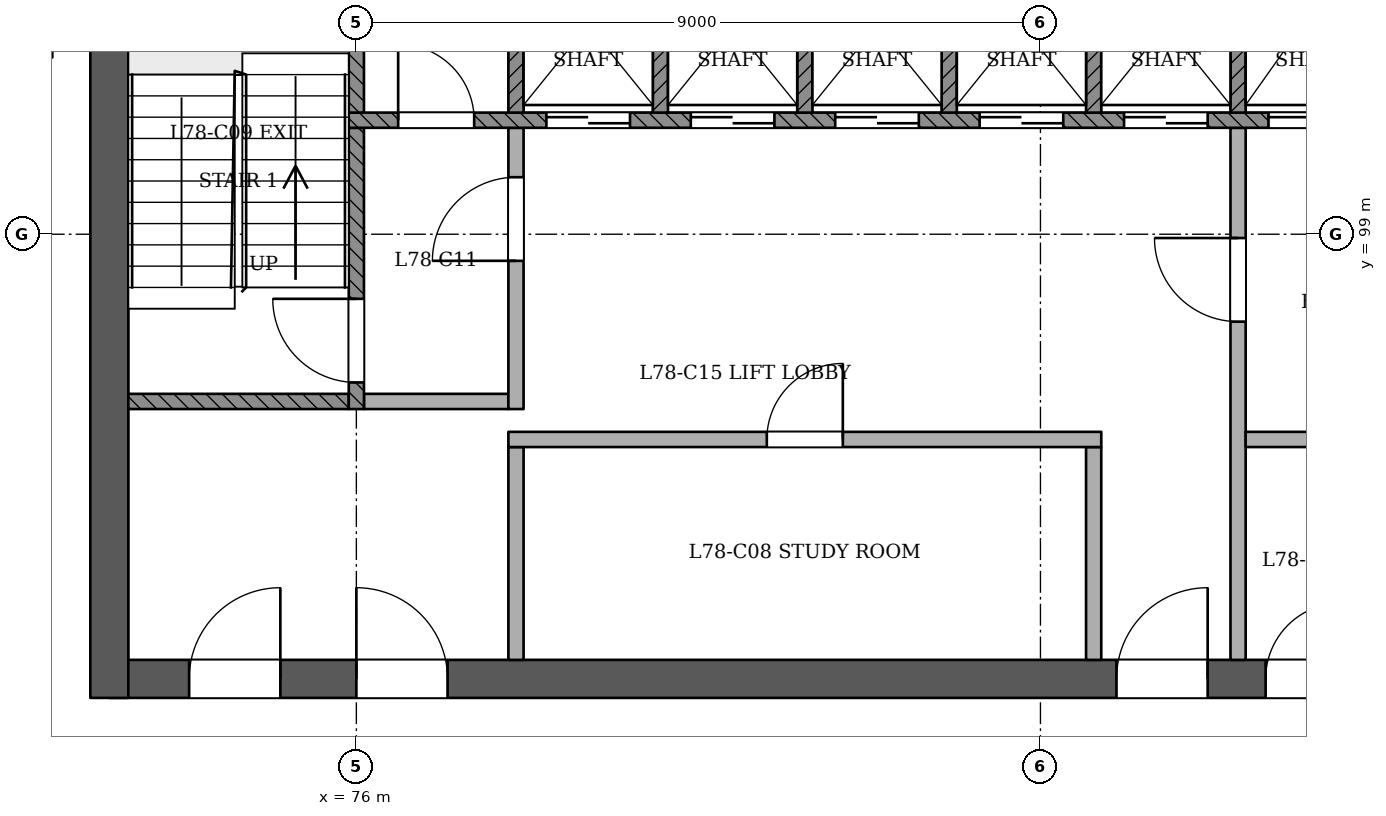
"""IFC4 building model, lengths in metres.
Left out: names, types, materials, properties, quantities, classifications, styles, units other than length and angle.
Written with IfcOpenShell. Run it as: python <this file> out.ifc"""

import sys

from ifc_helpers import new_model, si_unit, direction, frame, frame_2d, origin, place, context, subcontext, project, spatial, rectangle, extrude, element, fill, save


model = new_model("IFC4")
c1 = context("Model", 3, precision=1e-05, world=origin(), true_north=direction((0.0, 1.0)))
c2 = subcontext(c1, "Body", "Model", "MODEL_VIEW")
j1 = project(units=[si_unit("LENGTHUNIT", "METRE"), si_unit("PLANEANGLEUNIT", "RADIAN")], contexts=[c1])
p1 = place(None, origin())
s1 = spatial("IfcSite", under=j1, at=p1, CompositionType="ELEMENT")
p2 = place(p1, origin())
s2 = spatial("IfcBuilding", under=s1, at=p2, CompositionType="ELEMENT")
p3 = place(p2, frame((0.0, 0.0, 302.2)))
s3 = spatial("IfcBuildingStorey", under=s2, at=p3, CompositionType="ELEMENT", Elevation=302.2)
p4 = place(p3, frame((72.75, 93.15, 0.0), z_axis=(0.0, 0.0, 1.0), x_axis=(1.0, 0.0, 0.0)))
e1 = element("IfcWall", 1, at=p4, inside=s3, PredefinedType="SHEAR", context=c2, shape_type="SweptSolid", body=[
    extrude(rectangle(XDim=24.75, YDim=0.5, at=frame_2d((12.375, 0.0))), origin(), (0.0, 0.0, 1.0), 3.6),
])
p5 = place(p4, frame((1.05, 0.0, 0.0)))
e2 = element("IfcOpeningElement", 2, at=p5, cuts=e1, PredefinedType="OPENING", context=c2, shape_type="SweptSolid", body=[
    extrude(rectangle(XDim=1.2, YDim=2.1, at=frame_2d((0.6, 1.05))), frame((0.0, 0.26, 0.0), z_axis=(0.0, -1.0, 0.0), x_axis=(1.0, 0.0, 0.0)), (0.0, 0.0, 1.0), 0.521),
])
p6 = place(p4, frame((3.25, 0.0, 0.0)))
e3 = element("IfcOpeningElement", 3, at=p6, cuts=e1, PredefinedType="OPENING", context=c2, shape_type="SweptSolid", body=[
    extrude(rectangle(XDim=1.2, YDim=2.1, at=frame_2d((0.6, 1.05))), frame((0.0, 0.26, 0.0), z_axis=(0.0, -1.0, 0.0), x_axis=(1.0, 0.0, 0.0)), (0.0, 0.0, 1.0), 0.521),
])
p7 = place(p4, frame((13.25, 0.0, 0.0)))
e4 = element("IfcOpeningElement", 4, at=p7, cuts=e1, PredefinedType="OPENING", context=c2, shape_type="SweptSolid", body=[
    extrude(rectangle(XDim=1.2, YDim=2.1, at=frame_2d((0.6, 1.05))), frame((0.0, 0.26, 0.0), z_axis=(0.0, -1.0, 0.0), x_axis=(1.0, 0.0, 0.0)), (0.0, 0.0, 1.0), 0.521),
])
p8 = place(p4, frame((15.212, 0.0, 0.0)))
e5 = element("IfcOpeningElement", 5, at=p8, cuts=e1, PredefinedType="OPENING", context=c2, shape_type="SweptSolid", body=[
    extrude(rectangle(XDim=1.0, YDim=2.1, at=frame_2d((0.5, 1.05))), frame((0.0, 0.26, 0.0), z_axis=(0.0, -1.0, 0.0), x_axis=(1.0, 0.0, 0.0)), (0.0, 0.0, 1.0), 0.521),
])
p9 = place(p4, frame((18.05, 0.0, 0.0)))
e6 = element("IfcOpeningElement", 6, at=p9, cuts=e1, PredefinedType="OPENING", context=c2, shape_type="SweptSolid", body=[
    extrude(rectangle(XDim=1.0, YDim=2.1, at=frame_2d((0.5, 1.05))), frame((0.0, 0.26, 0.0), z_axis=(0.0, -1.0, 0.0), x_axis=(1.0, 0.0, 0.0)), (0.0, 0.0, 1.0), 0.521),
])
p10 = place(p4, frame((20.95, 0.0, 0.0)))
e7 = element("IfcOpeningElement", 7, at=p10, cuts=e1, PredefinedType="OPENING", context=c2, shape_type="SweptSolid", body=[
    extrude(rectangle(XDim=1.0, YDim=2.1, at=frame_2d((0.5, 1.05))), frame((0.0, 0.26, 0.0), z_axis=(0.0, -1.0, 0.0), x_axis=(1.0, 0.0, 0.0)), (0.0, 0.0, 1.0), 0.521),
])
p11 = place(p4, frame((22.837, 0.0, 0.0)))
e8 = element("IfcOpeningElement", 8, at=p11, cuts=e1, PredefinedType="OPENING", context=c2, shape_type="SweptSolid", body=[
    extrude(rectangle(XDim=1.0, YDim=2.1, at=frame_2d((0.5, 1.05))), frame((0.0, 0.26, 0.0), z_axis=(0.0, -1.0, 0.0), x_axis=(1.0, 0.0, 0.0)), (0.0, 0.0, 1.0), 0.521),
])
p12 = place(p3, frame((72.75, 103.65, 0.0), z_axis=(0.0, 0.0, 1.0), x_axis=(0.0, -1.0, 0.0)))
e9 = element("IfcWall", 9, at=p12, inside=s3, PredefinedType="SHEAR", context=c2, shape_type="SweptSolid", body=[
    extrude(rectangle(XDim=10.75, YDim=0.5, at=frame_2d((5.375, 0.0))), origin(), (0.0, 0.0, 1.0), 3.6),
])
p13 = place(p3, frame((72.0, 101.401, 0.0), z_axis=(0.0, 0.0, 1.0), x_axis=(-0.999999989991, -0.000141482738, 0.0)))
e10 = element("IfcWall", 10, at=p13, inside=s3, PredefinedType="PARTITIONING", context=c2, shape_type="SweptSolid", body=[
    extrude(rectangle(XDim=1.726, YDim=0.15, at=frame_2d((0.863, 0.0))), origin(), (0.0, 0.0, 1.0), 3.2),
])
for number, where, z_axis, x_axis in (
    (11, (78.1, 93.4, 0.0), (0.0, 0.0, 1.0), (0.0, 1.0, 0.0)),
    (12, (85.7, 93.4, 0.0), (0.0, 0.0, 1.0), (0.0, 1.0, 0.0)),
):
    element("IfcWall", number, at=place(p3, frame(where, z_axis=z_axis, x_axis=x_axis)), inside=s3, PredefinedType="PARTITIONING", context=c2, shape_type="SweptSolid", body=[
        extrude(rectangle(XDim=2.8, YDim=0.2, at=frame_2d((1.4, 0.0))), origin(), (0.0, 0.0, 1.0), 3.2),
    ])
p14 = place(p3, frame((87.6, 93.4, 0.0), z_axis=(0.0, 0.0, 1.0), x_axis=(0.0, 1.0, 0.0)))
e13 = element("IfcWall", 13, at=p14, inside=s3, PredefinedType="PARTITIONING", context=c2, shape_type="SweptSolid", body=[
    extrude(rectangle(XDim=7.0, YDim=0.2, at=frame_2d((3.5, 0.0))), origin(), (0.0, 0.0, 1.0), 3.2),
])
p15 = place(p14, frame((4.45, 0.0, 0.0)))
e14 = element("IfcOpeningElement", 14, at=p15, cuts=e13, PredefinedType="OPENING", context=c2, shape_type="SweptSolid", body=[
    extrude(rectangle(XDim=1.1, YDim=2.1, at=frame_2d((0.55, 1.05))), frame((0.0, 0.11, 0.0), z_axis=(0.0, -1.0, 0.0), x_axis=(1.0, 0.0, 0.0)), (0.0, 0.0, 1.0), 0.221),
])
p16 = place(p3, frame((78.0, 96.3, 0.0), z_axis=(0.0, 0.0, 1.0), x_axis=(1.0, 0.0, 0.0)))
e15 = element("IfcWall", 15, at=p16, inside=s3, PredefinedType="PARTITIONING", context=c2, shape_type="SweptSolid", body=[
    extrude(rectangle(XDim=7.8, YDim=0.2, at=frame_2d((3.9, 0.0))), origin(), (0.0, 0.0, 1.0), 3.2),
])
p17 = place(p16, frame((3.4, 0.0, 0.0)))
e16 = element("IfcOpeningElement", 16, at=p17, cuts=e15, PredefinedType="OPENING", context=c2, shape_type="SweptSolid", body=[
    extrude(rectangle(XDim=1.0, YDim=2.1, at=frame_2d((0.5, 1.05))), frame((0.0, 0.11, 0.0), z_axis=(0.0, -1.0, 0.0), x_axis=(1.0, 0.0, 0.0)), (0.0, 0.0, 1.0), 0.221),
])
p18 = place(p3, frame((87.7, 96.3, 0.0), z_axis=(0.0, 0.0, 1.0), x_axis=(1.0, 0.0, 0.0)))
e17 = element("IfcWall", 17, at=p18, inside=s3, PredefinedType="PARTITIONING", context=c2, shape_type="SweptSolid", body=[
    extrude(rectangle(XDim=3.6, YDim=0.2, at=frame_2d((1.8, 0.0))), origin(), (0.0, 0.0, 1.0), 3.2),
])
p19 = place(p3, frame((73.0, 96.8, 0.0), z_axis=(0.0, 0.0, 1.0), x_axis=(1.0, 0.0, 0.0)))
e18 = element("IfcWall", 18, at=p19, inside=s3, PredefinedType="SOLIDWALL", context=c2, shape_type="SweptSolid", body=[
    extrude(rectangle(XDim=2.9, YDim=0.2, at=frame_2d((1.45, 0.0))), origin(), (0.0, 0.0, 1.0), 3.2),
])
p20 = place(p3, frame((76.0, 96.7, 0.0), z_axis=(0.0, 0.0, 1.0), x_axis=(0.0, 1.0, 0.0)))
e19 = element("IfcWall", 19, at=p20, inside=s3, PredefinedType="SOLIDWALL", context=c2, shape_type="SweptSolid", body=[
    extrude(rectangle(XDim=3.7, YDim=0.2, at=frame_2d((1.85, 0.0))), origin(), (0.0, 0.0, 1.0), 3.2),
])
p21 = place(p20, frame((0.35, 0.0, 0.0)))
e20 = element("IfcOpeningElement", 20, at=p21, cuts=e19, PredefinedType="OPENING", context=c2, shape_type="SweptSolid", body=[
    extrude(rectangle(XDim=1.1, YDim=2.1, at=frame_2d((0.55, 1.05))), frame((0.0, 0.11, 0.0), z_axis=(0.0, -1.0, 0.0), x_axis=(1.0, 0.0, 0.0)), (0.0, 0.0, 1.0), 0.221),
])
p22 = place(p3, frame((76.1, 96.8, 0.0), z_axis=(0.0, 0.0, 1.0), x_axis=(1.0, 0.0, 0.0)))
e21 = element("IfcWall", 21, at=p22, inside=s3, PredefinedType="PARTITIONING", context=c2, shape_type="SweptSolid", body=[
    extrude(rectangle(XDim=1.9, YDim=0.2, at=frame_2d((0.95, 0.0))), origin(), (0.0, 0.0, 1.0), 3.2),
])
p23 = place(p3, frame((78.1, 96.7, 0.0), z_axis=(0.0, 0.0, 1.0), x_axis=(0.0, 1.0, 0.0)))
e22 = element("IfcWall", 22, at=p23, inside=s3, PredefinedType="PARTITIONING", context=c2, shape_type="SweptSolid", body=[
    extrude(rectangle(XDim=3.7, YDim=0.2, at=frame_2d((1.85, 0.0))), origin(), (0.0, 0.0, 1.0), 3.2),
])
p24 = place(p23, frame((1.95, 0.0, 0.0)))
e23 = element("IfcOpeningElement", 23, at=p24, cuts=e22, PredefinedType="OPENING", context=c2, shape_type="SweptSolid", body=[
    extrude(rectangle(XDim=1.1, YDim=2.1, at=frame_2d((0.55, 1.05))), frame((0.0, 0.11, 0.0), z_axis=(0.0, -1.0, 0.0), x_axis=(1.0, 0.0, 0.0)), (0.0, 0.0, 1.0), 0.221),
])
p25 = place(p3, frame((75.9, 100.5, 0.0), z_axis=(0.0, 0.0, 1.0), x_axis=(1.0, 0.0, 0.0)))
e24 = element("IfcWall", 24, at=p25, inside=s3, PredefinedType="SOLIDWALL", context=c2, shape_type="SweptSolid", body=[
    extrude(rectangle(XDim=18.2, YDim=0.2, at=frame_2d((9.1, 0.0))), origin(), (0.0, 0.0, 1.0), 3.2),
])
p26 = place(p25, frame((2.6, 0.0, 0.0)))
e25 = element("IfcOpeningElement", 25, at=p26, cuts=e24, PredefinedType="OPENING", context=c2, shape_type="SweptSolid", body=[
    extrude(rectangle(XDim=1.1, YDim=2.1, at=frame_2d((0.55, 1.05))), frame((0.0, 0.11, 0.0), z_axis=(0.0, -1.0, 0.0), x_axis=(1.0, 0.0, 0.0)), (0.0, 0.0, 1.0), 0.221),
])
p27 = place(p25, frame((4.5, 0.0, 0.0)))
e26 = element("IfcOpeningElement", 26, at=p27, cuts=e24, PredefinedType="OPENING", context=c2, shape_type="SweptSolid", body=[
    extrude(rectangle(XDim=1.1, YDim=2.1, at=frame_2d((0.55, 1.05))), frame((0.0, 0.11, 0.0), z_axis=(0.0, -1.0, 0.0), x_axis=(1.0, 0.0, 0.0)), (0.0, 0.0, 1.0), 0.221),
])
p28 = place(p25, frame((6.4, 0.0, 0.0)))
e27 = element("IfcOpeningElement", 27, at=p28, cuts=e24, PredefinedType="OPENING", context=c2, shape_type="SweptSolid", body=[
    extrude(rectangle(XDim=1.1, YDim=2.1, at=frame_2d((0.55, 1.05))), frame((0.0, 0.11, 0.0), z_axis=(0.0, -1.0, 0.0), x_axis=(1.0, 0.0, 0.0)), (0.0, 0.0, 1.0), 0.221),
])
p29 = place(p25, frame((8.3, 0.0, 0.0)))
e28 = element("IfcOpeningElement", 28, at=p29, cuts=e24, PredefinedType="OPENING", context=c2, shape_type="SweptSolid", body=[
    extrude(rectangle(XDim=1.1, YDim=2.1, at=frame_2d((0.55, 1.05))), frame((0.0, 0.11, 0.0), z_axis=(0.0, -1.0, 0.0), x_axis=(1.0, 0.0, 0.0)), (0.0, 0.0, 1.0), 0.221),
])
p30 = place(p25, frame((10.2, 0.0, 0.0)))
e29 = element("IfcOpeningElement", 29, at=p30, cuts=e24, PredefinedType="OPENING", context=c2, shape_type="SweptSolid", body=[
    extrude(rectangle(XDim=1.1, YDim=2.1, at=frame_2d((0.55, 1.05))), frame((0.0, 0.11, 0.0), z_axis=(0.0, -1.0, 0.0), x_axis=(1.0, 0.0, 0.0)), (0.0, 0.0, 1.0), 0.221),
])
p31 = place(p25, frame((12.1, 0.0, 0.0)))
e30 = element("IfcOpeningElement", 30, at=p31, cuts=e24, PredefinedType="OPENING", context=c2, shape_type="SweptSolid", body=[
    extrude(rectangle(XDim=1.1, YDim=2.1, at=frame_2d((0.55, 1.05))), frame((0.0, 0.11, 0.0), z_axis=(0.0, -1.0, 0.0), x_axis=(1.0, 0.0, 0.0)), (0.0, 0.0, 1.0), 0.221),
])
p32 = place(p25, frame((14.0, 0.0, 0.0)))
e31 = element("IfcOpeningElement", 31, at=p32, cuts=e24, PredefinedType="OPENING", context=c2, shape_type="SweptSolid", body=[
    extrude(rectangle(XDim=1.1, YDim=2.1, at=frame_2d((0.55, 1.05))), frame((0.0, 0.11, 0.0), z_axis=(0.0, -1.0, 0.0), x_axis=(1.0, 0.0, 0.0)), (0.0, 0.0, 1.0), 0.221),
])
p33 = place(p25, frame((0.65, 0.0, 0.0)))
e32 = element("IfcOpeningElement", 32, at=p33, cuts=e24, PredefinedType="OPENING", context=c2, shape_type="SweptSolid", body=[
    extrude(rectangle(XDim=1.0, YDim=2.1, at=frame_2d((0.5, 1.05))), frame((0.0, 0.11, 0.0), z_axis=(0.0, -1.0, 0.0), x_axis=(1.0, 0.0, 0.0)), (0.0, 0.0, 1.0), 0.221),
])
p34 = place(p25, frame((16.3, 0.0, 0.0)))
e33 = element("IfcOpeningElement", 33, at=p34, cuts=e24, PredefinedType="OPENING", context=c2, shape_type="SweptSolid", body=[
    extrude(rectangle(XDim=1.0, YDim=2.1, at=frame_2d((0.5, 1.05))), frame((0.0, 0.11, 0.0), z_axis=(0.0, -1.0, 0.0), x_axis=(1.0, 0.0, 0.0)), (0.0, 0.0, 1.0), 0.221),
])
for number, where, z_axis, x_axis in (
    (34, (76.0, 100.6, 0.0), (0.0, 0.0, 1.0), (0.0, 1.0, 0.0)),
    (35, (78.1, 100.6, 0.0), (0.0, 0.0, 1.0), (0.0, 1.0, 0.0)),
    (36, (80.0, 100.6, 0.0), (0.0, 0.0, 1.0), (0.0, 1.0, 0.0)),
    (37, (81.9, 100.6, 0.0), (0.0, 0.0, 1.0), (0.0, 1.0, 0.0)),
    (38, (83.8, 100.6, 0.0), (0.0, 0.0, 1.0), (0.0, 1.0, 0.0)),
    (39, (85.7, 100.6, 0.0), (0.0, 0.0, 1.0), (0.0, 1.0, 0.0)),
    (40, (87.6, 100.6, 0.0), (0.0, 0.0, 1.0), (0.0, 1.0, 0.0)),
):
    element("IfcWall", number, at=place(p3, frame(where, z_axis=z_axis, x_axis=x_axis)), inside=s3, PredefinedType="SOLIDWALL", context=c2, shape_type="SweptSolid", body=[
        extrude(rectangle(XDim=2.8, YDim=0.2, at=frame_2d((1.4, 0.0))), origin(), (0.0, 0.0, 1.0), 3.2),
    ])
p35 = place(p26, origin())
e41 = element("IfcDoor", 41, at=p35, inside=s3, OperationType="SLIDING_TO_RIGHT", PredefinedType="NOTDEFINED", context=c2, shape_type="SweptSolid", body=[
    extrude(rectangle(XDim=1.1, YDim=2.1, at=frame_2d((0.55, 1.05))), frame((0.0, 0.025, 0.0), z_axis=(0.0, -1.0, 0.0), x_axis=(1.0, 0.0, 0.0)), (0.0, 0.0, 1.0), 0.05),
])
fill(e25, e41)
p36 = place(p27, origin())
e42 = element("IfcDoor", 42, at=p36, inside=s3, OperationType="SLIDING_TO_LEFT", PredefinedType="NOTDEFINED", context=c2, shape_type="SweptSolid", body=[
    extrude(rectangle(XDim=1.1, YDim=2.1, at=frame_2d((0.55, 1.05))), frame((0.0, 0.025, 0.0), z_axis=(0.0, -1.0, 0.0), x_axis=(1.0, 0.0, 0.0)), (0.0, 0.0, 1.0), 0.05),
])
fill(e26, e42)
p37 = place(p28, origin())
e43 = element("IfcDoor", 43, at=p37, inside=s3, OperationType="SLIDING_TO_RIGHT", PredefinedType="NOTDEFINED", context=c2, shape_type="SweptSolid", body=[
    extrude(rectangle(XDim=1.1, YDim=2.1, at=frame_2d((0.55, 1.05))), frame((0.0, 0.025, 0.0), z_axis=(0.0, -1.0, 0.0), x_axis=(1.0, 0.0, 0.0)), (0.0, 0.0, 1.0), 0.05),
])
fill(e27, e43)
p38 = place(p29, origin())
e44 = element("IfcDoor", 44, at=p38, inside=s3, OperationType="SLIDING_TO_LEFT", PredefinedType="NOTDEFINED", context=c2, shape_type="SweptSolid", body=[
    extrude(rectangle(XDim=1.1, YDim=2.1, at=frame_2d((0.55, 1.05))), frame((0.0, 0.025, 0.0), z_axis=(0.0, -1.0, 0.0), x_axis=(1.0, 0.0, 0.0)), (0.0, 0.0, 1.0), 0.05),
])
fill(e28, e44)
p39 = place(p30, origin())
e45 = element("IfcDoor", 45, at=p39, inside=s3, OperationType="SLIDING_TO_RIGHT", PredefinedType="NOTDEFINED", context=c2, shape_type="SweptSolid", body=[
    extrude(rectangle(XDim=1.1, YDim=2.1, at=frame_2d((0.55, 1.05))), frame((0.0, 0.025, 0.0), z_axis=(0.0, -1.0, 0.0), x_axis=(1.0, 0.0, 0.0)), (0.0, 0.0, 1.0), 0.05),
])
fill(e29, e45)
p40 = place(p31, origin())
e46 = element("IfcDoor", 46, at=p40, inside=s3, OperationType="SLIDING_TO_RIGHT", PredefinedType="NOTDEFINED", context=c2, shape_type="SweptSolid", body=[
    extrude(rectangle(XDim=1.1, YDim=2.1, at=frame_2d((0.55, 1.05))), frame((0.0, 0.025, 0.0), z_axis=(0.0, -1.0, 0.0), x_axis=(1.0, 0.0, 0.0)), (0.0, 0.0, 1.0), 0.05),
])
fill(e30, e46)
p41 = place(p21, origin())
e47 = element("IfcDoor", 47, at=p41, inside=s3, OperationType="SINGLE_SWING_RIGHT", PredefinedType="NOTDEFINED", context=c2, shape_type="SweptSolid", body=[
    extrude(rectangle(XDim=1.1, YDim=2.1, at=frame_2d((0.55, 1.05))), frame((0.0, 0.025, 0.0), z_axis=(0.0, -1.0, 0.0), x_axis=(1.0, 0.0, 0.0)), (0.0, 0.0, 1.0), 0.05),
])
fill(e20, e47)
p42 = place(p24, origin())
e48 = element("IfcDoor", 48, at=p42, inside=s3, OperationType="SINGLE_SWING_LEFT", PredefinedType="NOTDEFINED", context=c2, shape_type="SweptSolid", body=[
    extrude(rectangle(XDim=1.1, YDim=2.1, at=frame_2d((0.55, 1.05))), frame((0.0, 0.025, 0.0), z_axis=(0.0, -1.0, 0.0), x_axis=(1.0, 0.0, 0.0)), (0.0, 0.0, 1.0), 0.05),
])
fill(e23, e48)
p43 = place(p15, origin())
e49 = element("IfcDoor", 49, at=p43, inside=s3, OperationType="SINGLE_SWING_RIGHT", PredefinedType="NOTDEFINED", context=c2, shape_type="SweptSolid", body=[
    extrude(rectangle(XDim=1.1, YDim=2.1, at=frame_2d((0.55, 1.05))), frame((0.0, 0.025, 0.0), z_axis=(0.0, -1.0, 0.0), x_axis=(1.0, 0.0, 0.0)), (0.0, 0.0, 1.0), 0.05),
])
fill(e14, e49)
p44 = place(p5, origin())
e50 = element("IfcDoor", 50, at=p44, inside=s3, OperationType="SINGLE_SWING_RIGHT", PredefinedType="NOTDEFINED", context=c2, shape_type="SweptSolid", body=[
    extrude(rectangle(XDim=1.2, YDim=2.1, at=frame_2d((0.6, 1.05))), frame((0.0, 0.025, 0.0), z_axis=(0.0, -1.0, 0.0), x_axis=(1.0, 0.0, 0.0)), (0.0, 0.0, 1.0), 0.05),
])
fill(e2, e50)
p45 = place(p6, origin())
e51 = element("IfcDoor", 51, at=p45, inside=s3, OperationType="SINGLE_SWING_LEFT", PredefinedType="NOTDEFINED", context=c2, shape_type="SweptSolid", body=[
    extrude(rectangle(XDim=1.2, YDim=2.1, at=frame_2d((0.6, 1.05))), frame((0.0, 0.025, 0.0), z_axis=(0.0, -1.0, 0.0), x_axis=(1.0, 0.0, 0.0)), (0.0, 0.0, 1.0), 0.05),
])
fill(e3, e51)
p46 = place(p7, origin())
e52 = element("IfcDoor", 52, at=p46, inside=s3, OperationType="SINGLE_SWING_RIGHT", PredefinedType="NOTDEFINED", context=c2, shape_type="SweptSolid", body=[
    extrude(rectangle(XDim=1.2, YDim=2.1, at=frame_2d((0.6, 1.05))), frame((0.0, 0.025, 0.0), z_axis=(0.0, -1.0, 0.0), x_axis=(1.0, 0.0, 0.0)), (0.0, 0.0, 1.0), 0.05),
])
fill(e4, e52)
p47 = place(p33, origin())
e53 = element("IfcDoor", 53, at=p47, inside=s3, OperationType="SINGLE_SWING_LEFT", PredefinedType="NOTDEFINED", context=c2, shape_type="SweptSolid", body=[
    extrude(rectangle(XDim=1.0, YDim=2.1, at=frame_2d((0.5, 1.05))), frame((0.0, 0.025, 0.0), z_axis=(0.0, -1.0, 0.0), x_axis=(1.0, 0.0, 0.0)), (0.0, 0.0, 1.0), 0.05),
])
fill(e32, e53)
p48 = place(p8, origin())
e54 = element("IfcDoor", 54, at=p48, inside=s3, OperationType="SINGLE_SWING_RIGHT", PredefinedType="NOTDEFINED", context=c2, shape_type="SweptSolid", body=[
    extrude(rectangle(XDim=1.0, YDim=2.1, at=frame_2d((0.5, 1.05))), frame((0.0, 0.025, 0.0), z_axis=(0.0, -1.0, 0.0), x_axis=(1.0, 0.0, 0.0)), (0.0, 0.0, 1.0), 0.05),
])
fill(e5, e54)
p49 = place(p17, origin())
e55 = element("IfcDoor", 55, at=p49, inside=s3, OperationType="SINGLE_SWING_RIGHT", PredefinedType="NOTDEFINED", context=c2, shape_type="SweptSolid", body=[
    extrude(rectangle(XDim=1.0, YDim=2.1, at=frame_2d((0.5, 1.05))), frame((0.0, 0.025, 0.0), z_axis=(0.0, -1.0, 0.0), x_axis=(1.0, 0.0, 0.0)), (0.0, 0.0, 1.0), 0.05),
])
fill(e16, e55)
save(model, sys.argv[1])
